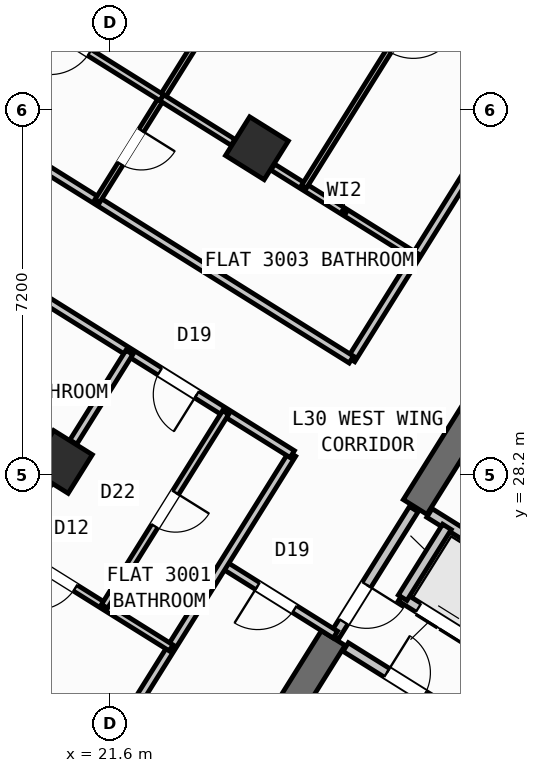
"""IFC4 building model, lengths in metres.
Left out: names, types, materials, properties, quantities, classifications, styles, units other than length and angle.
Written with IfcOpenShell. Run it as: python <this file> out.ifc"""

import sys

from ifc_helpers import new_model, si_unit, direction, frame, frame_2d, origin, origin_2d, place, context, subcontext, project, spatial, rectangle, hollow_rectangle, extrude, source, transform, mapped, element, fill, save


model = new_model("IFC4")
c1 = context("Model", 3, precision=1e-05, world=origin(), true_north=direction((0.0, 1.0)))
c2 = subcontext(c1, "Body", "Model", "MODEL_VIEW")
j1 = project(units=[si_unit("LENGTHUNIT", "METRE"), si_unit("PLANEANGLEUNIT", "RADIAN")], contexts=[c1])
p1 = place(None, origin())
s1 = spatial("IfcSite", under=j1, at=p1, CompositionType="ELEMENT")
p2 = place(p1, origin())
s2 = spatial("IfcBuilding", under=s1, at=p2, CompositionType="ELEMENT")
p3 = place(p2, frame((0.0, 0.0, 119.7)))
s3 = spatial("IfcBuildingStorey", under=s2, at=p3, CompositionType="ELEMENT", Elevation=119.7)
p4 = place(p3, frame((29.517, 30.594, 0.0), z_axis=(0.0, 0.0, 1.0), x_axis=(-0.529906864564, -0.848055844204, 0.0)))
e1 = element("IfcWall", 1, at=p4, inside=s3, PredefinedType="SHEAR", context=c2, shape_type="SweptSolid", body=[
    extrude(rectangle(XDim=3.575, YDim=0.55, at=frame_2d((1.788, 0.0))), origin(), (0.0, 0.0, 1.0), 3.35),
])
p5 = place(p3, frame((26.007, 24.976, 0.0), z_axis=(0.0, 0.0, 1.0), x_axis=(-0.529923795287, -0.848045264823, 0.0)))
e2 = element("IfcWall", 2, at=p5, inside=s3, PredefinedType="SHEAR", context=c2, shape_type="SweptSolid", body=[
    extrude(rectangle(XDim=6.425, YDim=0.55, at=frame_2d((3.212, 0.0))), origin(), (0.0, 0.0, 1.0), 3.35),
])
m1 = source(origin(), c2, "Body", "SweptSolid", [
    extrude(hollow_rectangle(XDim=0.9, YDim=0.9, WallThickness=0.036, at=origin_2d()), origin(), (0.0, 0.0, 1.0), 3.6),
])
for number, where, z_axis, x_axis in (
    (3, (24.5, 34.643, 0.0), (0.0, 0.0, 1.0), (-0.848, 0.53, 0.0)),
    (4, (20.632, 28.452, 0.0), (0.0, 0.0, 1.0), (-0.848, 0.53, 0.0)),
):
    element("IfcColumn", number, at=place(p3, frame(where, z_axis=z_axis, x_axis=x_axis)), inside=s3, PredefinedType="COLUMN", context=c2, shape_type="MappedRepresentation", body=[
        mapped(m1, transform((0.0, 0.0, 0.0), scale=1.0)),
    ])
p6 = place(p3, frame((31.76, 12.183, 0.0), z_axis=(0.0, 0.0, 1.0), x_axis=(-0.848047074256, 0.529920899612, 0.0)))
e5 = element("IfcWall", 5, at=p6, inside=s3, PredefinedType="STANDARD", context=c2, shape_type="SweptSolid", body=[
    extrude(rectangle(XDim=30.652, YDim=0.32, at=frame_2d((15.326, 0.0))), origin(), (0.0, 0.0, 1.0), 3.35),
])
p7 = place(p6, frame((15.153, 0.0, 0.0)))
e6 = element("IfcOpeningElement", 6, at=p7, cuts=e5, PredefinedType="OPENING", context=c2, shape_type="SweptSolid", body=[
    extrude(rectangle(XDim=1.2, YDim=2.15, at=frame_2d((0.6, 1.075))), frame((0.0, 0.17, 0.0), z_axis=(0.0, -1.0, 0.0), x_axis=(1.0, 0.0, 0.0)), (0.0, 0.0, 1.0), 0.34),
])
p8 = place(p6, frame((2.002, 0.0, 0.8)))
e7 = element("IfcOpeningElement", 7, at=p8, cuts=e5, PredefinedType="OPENING", context=c2, shape_type="SweptSolid", body=[
    extrude(rectangle(XDim=2.1, YDim=1.55, at=frame_2d((1.05, 0.775))), frame((0.0, 0.17, 0.0), z_axis=(0.0, -1.0, 0.0), x_axis=(1.0, 0.0, 0.0)), (0.0, 0.0, 1.0), 0.34),
])
p9 = place(p6, frame((7.206, 0.0, 0.8)))
e8 = element("IfcOpeningElement", 8, at=p9, cuts=e5, PredefinedType="OPENING", context=c2, shape_type="SweptSolid", body=[
    extrude(rectangle(XDim=2.1, YDim=1.55, at=frame_2d((1.05, 0.775))), frame((0.0, 0.17, 0.0), z_axis=(0.0, -1.0, 0.0), x_axis=(1.0, 0.0, 0.0)), (0.0, 0.0, 1.0), 0.34),
])
p10 = place(p6, frame((12.648, 0.0, 1.0)))
e9 = element("IfcOpeningElement", 9, at=p10, cuts=e5, PredefinedType="OPENING", context=c2, shape_type="SweptSolid", body=[
    extrude(rectangle(XDim=0.9, YDim=1.25, at=frame_2d((0.45, 0.625))), frame((0.0, 0.17, 0.0), z_axis=(0.0, -1.0, 0.0), x_axis=(1.0, 0.0, 0.0)), (0.0, 0.0, 1.0), 0.34),
])
p11 = place(p6, frame((19.458, 0.0, 0.95)))
e10 = element("IfcOpeningElement", 10, at=p11, cuts=e5, PredefinedType="OPENING", context=c2, shape_type="SweptSolid", body=[
    extrude(rectangle(XDim=1.2, YDim=1.4, at=frame_2d((0.6, 0.7))), frame((0.0, 0.17, 0.0), z_axis=(0.0, -1.0, 0.0), x_axis=(1.0, 0.0, 0.0)), (0.0, 0.0, 1.0), 0.34),
])
p12 = place(p6, frame((21.858, 0.0, 0.95)))
e11 = element("IfcOpeningElement", 11, at=p12, cuts=e5, PredefinedType="OPENING", context=c2, shape_type="SweptSolid", body=[
    extrude(rectangle(XDim=1.2, YDim=1.4, at=frame_2d((0.6, 0.7))), frame((0.0, 0.17, 0.0), z_axis=(0.0, -1.0, 0.0), x_axis=(1.0, 0.0, 0.0)), (0.0, 0.0, 1.0), 0.34),
])
p13 = place(p6, frame((27.266, 0.0, 0.8)))
e12 = element("IfcOpeningElement", 12, at=p13, cuts=e5, PredefinedType="OPENING", context=c2, shape_type="SweptSolid", body=[
    extrude(rectangle(XDim=2.1, YDim=1.55, at=frame_2d((1.05, 0.775))), frame((0.0, 0.17, 0.0), z_axis=(0.0, -1.0, 0.0), x_axis=(1.0, 0.0, 0.0)), (0.0, 0.0, 1.0), 0.34),
])
p14 = place(p3, frame((17.424, 47.083, 0.0), z_axis=(0.0, 0.0, 1.0), x_axis=(0.848049927979, -0.529916332693, 0.0)))
e13 = element("IfcWall", 13, at=p14, inside=s3, PredefinedType="STANDARD", context=c2, shape_type="SweptSolid", body=[
    extrude(rectangle(XDim=29.223, YDim=0.32, at=frame_2d((14.612, 0.0))), origin(), (0.0, 0.0, 1.0), 3.35),
])
p15 = place(p14, frame((8.839, 0.0, 0.0)))
e14 = element("IfcOpeningElement", 14, at=p15, cuts=e13, PredefinedType="OPENING", context=c2, shape_type="SweptSolid", body=[
    extrude(rectangle(XDim=1.05, YDim=2.15, at=frame_2d((0.525, 1.075))), frame((0.0, 0.17, 0.0), z_axis=(0.0, -1.0, 0.0), x_axis=(1.0, 0.0, 0.0)), (0.0, 0.0, 1.0), 0.34),
])
p16 = place(p14, frame((0.719, 0.0, 0.85)))
e15 = element("IfcOpeningElement", 15, at=p16, cuts=e13, PredefinedType="OPENING", context=c2, shape_type="SweptSolid", body=[
    extrude(rectangle(XDim=1.8, YDim=1.5, at=frame_2d((0.9, 0.75))), frame((0.0, 0.17, 0.0), z_axis=(0.0, -1.0, 0.0), x_axis=(1.0, 0.0, 0.0)), (0.0, 0.0, 1.0), 0.34),
])
p17 = place(p14, frame((3.981, 0.0, 0.85)))
e16 = element("IfcOpeningElement", 16, at=p17, cuts=e13, PredefinedType="OPENING", context=c2, shape_type="SweptSolid", body=[
    extrude(rectangle(XDim=1.5, YDim=1.5, at=frame_2d((0.75, 0.75))), frame((0.0, 0.17, 0.0), z_axis=(0.0, -1.0, 0.0), x_axis=(1.0, 0.0, 0.0)), (0.0, 0.0, 1.0), 0.34),
])
p18 = place(p14, frame((7.021, 0.0, 0.95)))
e17 = element("IfcOpeningElement", 17, at=p18, cuts=e13, PredefinedType="OPENING", context=c2, shape_type="SweptSolid", body=[
    extrude(rectangle(XDim=1.2, YDim=1.4, at=frame_2d((0.6, 0.7))), frame((0.0, 0.17, 0.0), z_axis=(0.0, -1.0, 0.0), x_axis=(1.0, 0.0, 0.0)), (0.0, 0.0, 1.0), 0.34),
])
p19 = place(p14, frame((14.471, 0.0, 0.95)))
e18 = element("IfcOpeningElement", 18, at=p19, cuts=e13, PredefinedType="OPENING", context=c2, shape_type="SweptSolid", body=[
    extrude(rectangle(XDim=1.2, YDim=1.4, at=frame_2d((0.6, 0.7))), frame((0.0, 0.17, 0.0), z_axis=(0.0, -1.0, 0.0), x_axis=(1.0, 0.0, 0.0)), (0.0, 0.0, 1.0), 0.34),
])
p20 = place(p14, frame((17.254, 0.0, 1.0)))
e19 = element("IfcOpeningElement", 19, at=p20, cuts=e13, PredefinedType="OPENING", context=c2, shape_type="SweptSolid", body=[
    extrude(rectangle(XDim=0.9, YDim=1.25, at=frame_2d((0.45, 0.625))), frame((0.0, 0.17, 0.0), z_axis=(0.0, -1.0, 0.0), x_axis=(1.0, 0.0, 0.0)), (0.0, 0.0, 1.0), 0.34),
])
p21 = place(p14, frame((20.764, 0.0, 0.8)))
e20 = element("IfcOpeningElement", 20, at=p21, cuts=e13, PredefinedType="OPENING", context=c2, shape_type="SweptSolid", body=[
    extrude(rectangle(XDim=2.1, YDim=1.55, at=frame_2d((1.05, 0.775))), frame((0.0, 0.17, 0.0), z_axis=(0.0, -1.0, 0.0), x_axis=(1.0, 0.0, 0.0)), (0.0, 0.0, 1.0), 0.34),
])
p22 = place(p14, frame((25.403, 0.0, 0.8)))
e21 = element("IfcOpeningElement", 21, at=p22, cuts=e13, PredefinedType="OPENING", context=c2, shape_type="SweptSolid", body=[
    extrude(rectangle(XDim=2.1, YDim=1.55, at=frame_2d((1.05, 0.775))), frame((0.0, 0.17, 0.0), z_axis=(0.0, -1.0, 0.0), x_axis=(1.0, 0.0, 0.0)), (0.0, 0.0, 1.0), 0.34),
])
p23 = place(p3, frame((31.822, 24.998, 0.0), z_axis=(0.0, 0.0, 1.0), x_axis=(-0.848036912365, 0.52993716162, 0.0)))
e22 = element("IfcWall", 22, at=p23, inside=s3, PredefinedType="STANDARD", context=c2, shape_type="SweptSolid", body=[
    extrude(rectangle(XDim=4.618, YDim=0.2, at=frame_2d((2.309, 0.0))), origin(), (0.0, 0.0, 1.0), 3.34),
])
p24 = place(p3, frame((32.108, 22.814, 0.0), z_axis=(0.0, 0.0, 1.0), x_axis=(-0.848042229521, 0.529928652696, 0.0)))
e23 = element("IfcWall", 23, at=p24, inside=s3, PredefinedType="STANDARD", context=c2, shape_type="SweptSolid", body=[
    extrude(rectangle(XDim=5.62, YDim=0.2, at=frame_2d((2.81, 0.0))), origin(), (0.0, 0.0, 1.0), 3.34),
])
p25 = place(p24, frame((0.39, 0.0, 0.0)))
e24 = element("IfcOpeningElement", 24, at=p25, cuts=e23, PredefinedType="OPENING", context=c2, shape_type="SweptSolid", body=[
    extrude(rectangle(XDim=1.1, YDim=2.15, at=frame_2d((0.55, 1.075))), frame((0.0, 0.11, 0.0), z_axis=(0.0, -1.0, 0.0), x_axis=(1.0, 0.0, 0.0)), (0.0, 0.0, 1.0), 0.22),
])
p26 = place(p24, frame((2.25, 0.0, 0.0)))
e25 = element("IfcOpeningElement", 25, at=p26, cuts=e23, PredefinedType="OPENING", context=c2, shape_type="SweptSolid", body=[
    extrude(rectangle(XDim=1.1, YDim=2.15, at=frame_2d((0.55, 1.075))), frame((0.0, 0.11, 0.0), z_axis=(0.0, -1.0, 0.0), x_axis=(1.0, 0.0, 0.0)), (0.0, 0.0, 1.0), 0.22),
])
p27 = place(p24, frame((4.11, 0.0, 0.0)))
e26 = element("IfcOpeningElement", 26, at=p27, cuts=e23, PredefinedType="OPENING", context=c2, shape_type="SweptSolid", body=[
    extrude(rectangle(XDim=1.1, YDim=2.15, at=frame_2d((0.55, 1.075))), frame((0.0, 0.11, 0.0), z_axis=(0.0, -1.0, 0.0), x_axis=(1.0, 0.0, 0.0)), (0.0, 0.0, 1.0), 0.22),
])
p28 = place(p3, frame((28.25, 27.17, 0.0), z_axis=(0.0, 0.0, 1.0), x_axis=(-0.529905827651, -0.848056492117, 0.0)))
e27 = element("IfcWall", 27, at=p28, inside=s3, PredefinedType="STANDARD", context=c2, shape_type="SweptSolid", body=[
    extrude(rectangle(XDim=1.65, YDim=0.2, at=frame_2d((0.825, 0.0))), origin(), (0.0, 0.0, 1.0), 3.34),
])
p29 = place(p3, frame((31.525, 21.504, 0.0), z_axis=(0.0, 0.0, 1.0), x_axis=(-0.848040211232, 0.529931882541, 0.0)))
e28 = element("IfcWall", 28, at=p29, inside=s3, PredefinedType="STANDARD", context=c2, shape_type="SweptSolid", body=[
    extrude(rectangle(XDim=6.218, YDim=0.2, at=frame_2d((3.109, 0.0))), origin(), (0.0, 0.0, 1.0), 3.34),
])
p30 = place(p29, frame((4.4, 0.0, 0.0)))
e29 = element("IfcOpeningElement", 29, at=p30, cuts=e28, PredefinedType="OPENING", context=c2, shape_type="SweptSolid", body=[
    extrude(rectangle(XDim=0.86, YDim=2.05, at=frame_2d((0.43, 1.025))), frame((0.0, 0.11, 0.0), z_axis=(0.0, -1.0, 0.0), x_axis=(1.0, 0.0, 0.0)), (0.0, 0.0, 1.0), 0.22),
])
p31 = place(p29, frame((1.45, 0.0, 0.0)))
e30 = element("IfcOpeningElement", 30, at=p31, cuts=e28, PredefinedType="OPENING", context=c2, shape_type="SweptSolid", body=[
    extrude(rectangle(XDim=0.86, YDim=2.05, at=frame_2d((0.43, 1.025))), frame((0.0, 0.11, 0.0), z_axis=(0.0, -1.0, 0.0), x_axis=(1.0, 0.0, 0.0)), (0.0, 0.0, 1.0), 0.22),
])
p32 = place(p3, frame((27.596, 27.52, 0.0), z_axis=(0.0, 0.0, 1.0), x_axis=(-0.529865479138, -0.848081702443, 0.0)))
e31 = element("IfcWall", 31, at=p32, inside=s3, PredefinedType="STANDARD", context=c2, shape_type="SweptSolid", body=[
    extrude(rectangle(XDim=2.96, YDim=0.2, at=frame_2d((1.48, 0.0))), origin(), (0.0, 0.0, 1.0), 3.34),
])
p33 = place(p32, frame((1.76, 0.0, 0.0)))
e32 = element("IfcOpeningElement", 32, at=p33, cuts=e31, PredefinedType="OPENING", context=c2, shape_type="SweptSolid", body=[
    extrude(rectangle(XDim=0.86, YDim=2.05, at=frame_2d((0.43, 1.025))), frame((0.0, 0.11, 0.0), z_axis=(0.0, -1.0, 0.0), x_axis=(1.0, 0.0, 0.0)), (0.0, 0.0, 1.0), 0.22),
])
p34 = place(p3, frame((26.049, 25.044, 0.0), z_axis=(0.0, 0.0, 1.0), x_axis=(-0.848050851465, 0.529914854792, 0.0)))
e33 = element("IfcWall", 33, at=p34, inside=s3, PredefinedType="PARTITIONING", context=c2, shape_type="SweptSolid", body=[
    extrude(rectangle(XDim=2.61, YDim=0.16, at=frame_2d((1.305, 0.0))), origin(), (0.0, 0.0, 1.0), 2.775),
])
p35 = place(p34, frame((0.95, 0.0, 0.0)))
e34 = element("IfcOpeningElement", 34, at=p35, cuts=e33, PredefinedType="OPENING", context=c2, shape_type="SweptSolid", body=[
    extrude(rectangle(XDim=0.86, YDim=2.05, at=frame_2d((0.43, 1.025))), frame((0.0, 0.09, 0.0), z_axis=(0.0, -1.0, 0.0), x_axis=(1.0, 0.0, 0.0)), (0.0, 0.0, 1.0), 0.18),
])
p36 = place(p3, frame((31.239, 38.274, 0.0), z_axis=(0.0, 0.0, 1.0), x_axis=(-0.529920220799, -0.848047498427, 0.0)))
e35 = element("IfcWall", 35, at=p36, inside=s3, PredefinedType="PARTITIONING", context=c2, shape_type="SweptSolid", body=[
    extrude(rectangle(XDim=9.2, YDim=0.16, at=frame_2d((4.6, 0.0))), origin(), (0.0, 0.0, 1.0), 3.34),
])
p37 = place(p3, frame((25.198, 28.606, 0.0), z_axis=(0.0, 0.0, 1.0), x_axis=(-0.529926497642, -0.848043576178, 0.0)))
e36 = element("IfcWall", 36, at=p37, inside=s3, PredefinedType="PARTITIONING", context=c2, shape_type="SweptSolid", body=[
    extrude(rectangle(XDim=10.3, YDim=0.16, at=frame_2d((5.15, 0.0))), origin(), (0.0, 0.0, 1.0), 3.34),
])
p38 = place(p3, frame((26.363, 30.472, 0.0), z_axis=(0.0, 0.0, 1.0), x_axis=(-0.848052408131, 0.529912363569, 0.0)))
e37 = element("IfcWall", 37, at=p38, inside=s3, PredefinedType="PARTITIONING", context=c2, shape_type="SweptSolid", body=[
    extrude(rectangle(XDim=16.73, YDim=0.16, at=frame_2d((8.365, 0.0))), origin(), (0.0, 0.0, 1.0), 3.34),
])
p39 = place(p38, frame((7.55, 0.0, 0.0)))
e38 = element("IfcOpeningElement", 38, at=p39, cuts=e37, PredefinedType="OPENING", context=c2, shape_type="SweptSolid", body=[
    extrude(rectangle(XDim=1.0, YDim=2.1, at=frame_2d((0.5, 1.05))), frame((0.0, 0.09, 0.0), z_axis=(0.0, -1.0, 0.0), x_axis=(1.0, 0.0, 0.0)), (0.0, 0.0, 1.0), 0.18),
])
p40 = place(p38, frame((11.14, 0.0, 0.0)))
e39 = element("IfcOpeningElement", 39, at=p40, cuts=e37, PredefinedType="OPENING", context=c2, shape_type="SweptSolid", body=[
    extrude(rectangle(XDim=1.0, YDim=2.1, at=frame_2d((0.5, 1.05))), frame((0.0, 0.09, 0.0), z_axis=(0.0, -1.0, 0.0), x_axis=(1.0, 0.0, 0.0)), (0.0, 0.0, 1.0), 0.18),
])
p41 = place(p3, frame((25.198, 28.606, 0.0), z_axis=(0.0, 0.0, 1.0), x_axis=(-0.848052408131, 0.529912363569, 0.0)))
e40 = element("IfcWall", 40, at=p41, inside=s3, PredefinedType="PARTITIONING", context=c2, shape_type="SweptSolid", body=[
    extrude(rectangle(XDim=16.73, YDim=0.16, at=frame_2d((8.365, 0.0))), origin(), (0.0, 0.0, 1.0), 3.34),
])
p42 = place(p41, frame((2.22, 0.0, 0.0)))
e41 = element("IfcOpeningElement", 41, at=p42, cuts=e40, PredefinedType="OPENING", context=c2, shape_type="SweptSolid", body=[
    extrude(rectangle(XDim=0.86, YDim=2.05, at=frame_2d((0.43, 1.025))), frame((0.0, 0.09, 0.0), z_axis=(0.0, -1.0, 0.0), x_axis=(1.0, 0.0, 0.0)), (0.0, 0.0, 1.0), 0.18),
])
p43 = place(p41, frame((12.084, 0.0, 0.0)))
e42 = element("IfcOpeningElement", 42, at=p43, cuts=e40, PredefinedType="OPENING", context=c2, shape_type="SweptSolid", body=[
    extrude(rectangle(XDim=1.0, YDim=2.1, at=frame_2d((0.5, 1.05))), frame((0.0, 0.09, 0.0), z_axis=(0.0, -1.0, 0.0), x_axis=(1.0, 0.0, 0.0)), (0.0, 0.0, 1.0), 0.18),
])
p44 = place(p3, frame((21.983, 30.615, 0.0), z_axis=(0.0, 0.0, 1.0), x_axis=(-0.529956894714, -0.848024580862, 0.0)))
e43 = element("IfcWall", 43, at=p44, inside=s3, PredefinedType="PARTITIONING", context=c2, shape_type="SweptSolid", body=[
    extrude(rectangle(XDim=2.088, YDim=0.16, at=frame_2d((1.044, 0.0))), origin(), (0.0, 0.0, 1.0), 2.775),
])
p45 = place(p3, frame((22.807, 24.781, 0.0), z_axis=(0.0, 0.0, 1.0), x_axis=(-0.84803087207, 0.529946827537, 0.0)))
e44 = element("IfcWall", 44, at=p45, inside=s3, PredefinedType="PLUMBINGWALL", context=c2, shape_type="SweptSolid", body=[
    extrude(rectangle(XDim=3.79, YDim=0.14, at=frame_2d((1.895, 0.0))), origin(), (0.0, 0.0, 1.0), 3.34),
])
p46 = place(p45, frame((2.23, 0.0, 0.0)))
e45 = element("IfcOpeningElement", 45, at=p46, cuts=e44, PredefinedType="OPENING", context=c2, shape_type="SweptSolid", body=[
    extrude(rectangle(XDim=0.92, YDim=2.08, at=frame_2d((0.46, 1.04))), frame((0.0, 0.08, 0.0), z_axis=(0.0, -1.0, 0.0), x_axis=(1.0, 0.0, 0.0)), (0.0, 0.0, 1.0), 0.16),
])
p47 = place(p3, frame((23.883, 29.427, 0.0), z_axis=(0.0, 0.0, 1.0), x_axis=(-0.529950281337, -0.84802871373, 0.0)))
e46 = element("IfcWall", 46, at=p47, inside=s3, PredefinedType="PLUMBINGWALL", context=c2, shape_type="SweptSolid", body=[
    extrude(rectangle(XDim=4.51, YDim=0.14, at=frame_2d((2.255, 0.0))), origin(), (0.0, 0.0, 1.0), 2.995),
])
p48 = place(p47, frame((1.865, 0.0, 0.0)))
e47 = element("IfcOpeningElement", 47, at=p48, cuts=e46, PredefinedType="OPENING", context=c2, shape_type="SweptSolid", body=[
    extrude(rectangle(XDim=0.78, YDim=2.05, at=frame_2d((0.39, 1.025))), frame((0.0, 0.08, 0.0), z_axis=(0.0, -1.0, 0.0), x_axis=(1.0, 0.0, 0.0)), (0.0, 0.0, 1.0), 0.16),
])
p49 = place(p3, frame((26.37, 41.635, 0.0), z_axis=(0.0, 0.0, 1.0), x_axis=(-0.529917830441, -0.848048992088, 0.0)))
e48 = element("IfcWall", 48, at=p49, inside=s3, PredefinedType="PARTITIONING", context=c2, shape_type="SweptSolid", body=[
    extrude(rectangle(XDim=9.47, YDim=0.11, at=frame_2d((4.735, 0.0))), origin(), (0.0, 0.0, 1.0), 2.995),
])
p50 = place(p49, frame((7.83, 0.0, 0.0)))
e49 = element("IfcOpeningElement", 49, at=p50, cuts=e48, PredefinedType="OPENING", context=c2, shape_type="SweptSolid", body=[
    extrude(rectangle(XDim=0.78, YDim=2.05, at=frame_2d((0.39, 1.025))), frame((0.0, 0.065, 0.0), z_axis=(0.0, -1.0, 0.0), x_axis=(1.0, 0.0, 0.0)), (0.0, 0.0, 1.0), 0.13),
])
p51 = place(p49, frame((3.075, 0.0, 0.0)))
e50 = element("IfcOpeningElement", 50, at=p51, cuts=e48, PredefinedType="OPENING", context=c2, shape_type="SweptSolid", body=[
    extrude(rectangle(XDim=0.92, YDim=2.08, at=frame_2d((0.46, 1.04))), frame((0.0, 0.065, 0.0), z_axis=(0.0, -1.0, 0.0), x_axis=(1.0, 0.0, 0.0)), (0.0, 0.0, 1.0), 0.13),
])
p52 = place(p3, frame((22.623, 35.639, 0.0), z_axis=(0.0, 0.0, 1.0), x_axis=(-0.8480485946, 0.529918466555, 0.0)))
e51 = element("IfcWall", 51, at=p52, inside=s3, PredefinedType="PLUMBINGWALL", context=c2, shape_type="SweptSolid", body=[
    extrude(rectangle(XDim=3.818, YDim=0.14, at=frame_2d((1.909, 0.0))), origin(), (0.0, 0.0, 1.0), 2.775),
])
p53 = place(p52, frame((1.68, 0.0, 0.0)))
e52 = element("IfcOpeningElement", 52, at=p53, cuts=e51, PredefinedType="OPENING", context=c2, shape_type="SweptSolid", body=[
    extrude(rectangle(XDim=0.92, YDim=2.08, at=frame_2d((0.46, 1.04))), frame((0.0, 0.08, 0.0), z_axis=(0.0, -1.0, 0.0), x_axis=(1.0, 0.0, 0.0)), (0.0, 0.0, 1.0), 0.16),
])
p54 = place(p3, frame((27.635, 32.507, 0.0), z_axis=(0.0, 0.0, 1.0), x_axis=(-0.848064240775, 0.529893426567, 0.0)))
e53 = element("IfcWall", 53, at=p54, inside=s3, PredefinedType="PLUMBINGWALL", context=c2, shape_type="SweptSolid", body=[
    extrude(rectangle(XDim=3.328, YDim=0.14, at=frame_2d((1.664, 0.0))), origin(), (0.0, 0.0, 1.0), 2.775),
])
p55 = place(p3, frame((24.029, 34.76, 0.0), z_axis=(0.0, 0.0, 1.0), x_axis=(-0.848023120795, 0.529959231071, 0.0)))
e54 = element("IfcWall", 54, at=p55, inside=s3, PredefinedType="PLUMBINGWALL", context=c2, shape_type="SweptSolid", body=[
    extrude(rectangle(XDim=1.658, YDim=0.14, at=frame_2d((0.829, 0.0))), origin(), (0.0, 0.0, 1.0), 2.775),
])
p56 = place(p3, frame((29.177, 39.881, 0.0), z_axis=(0.0, 0.0, 1.0), x_axis=(-0.529930649952, -0.848040981463, 0.0)))
e55 = element("IfcWall", 55, at=p56, inside=s3, PredefinedType="PARTITIONING", context=c2, shape_type="SweptSolid", body=[
    extrude(rectangle(XDim=7.07, YDim=0.11, at=frame_2d((3.535, 0.0))), origin(), (0.0, 0.0, 1.0), 3.34),
])
p57 = place(p56, frame((3.0, 0.0, 0.0)))
e56 = element("IfcOpeningElement", 56, at=p57, cuts=e55, PredefinedType="OPENING", context=c2, shape_type="SweptSolid", body=[
    extrude(rectangle(XDim=0.92, YDim=2.08, at=frame_2d((0.46, 1.04))), frame((0.0, 0.065, 0.0), z_axis=(0.0, -1.0, 0.0), x_axis=(1.0, 0.0, 0.0)), (0.0, 0.0, 1.0), 0.13),
])
m2 = source(origin(), c2, "Body", "SweptSolid", [
    extrude(rectangle(XDim=1.1, YDim=2.15, at=frame_2d((0.55, 1.075))), frame((0.0, 0.025, 0.0), z_axis=(0.0, -1.0, 0.0), x_axis=(1.0, 0.0, 0.0)), (0.0, 0.0, 1.0), 0.05),
])
p58 = place(p27, origin())
e57 = element("IfcDoor", 57, at=p58, inside=s3, OperationType="DOUBLE_DOOR_SLIDING", PredefinedType="DOOR", context=c2, shape_type="MappedRepresentation", body=[
    mapped(m2, transform((0.0, 0.0, 0.0), scale=1.0)),
])
fill(e26, e57)
m3 = source(origin(), c2, "Body", "SweptSolid", [
    extrude(rectangle(XDim=0.86, YDim=2.05, at=frame_2d((0.43, 1.025))), frame((0.0, 0.025, 0.0), z_axis=(0.0, -1.0, 0.0), x_axis=(1.0, 0.0, 0.0)), (0.0, 0.0, 1.0), 0.05),
])
p59 = place(p30, frame((0.86, 0.0, 0.0), z_axis=(0.0, 0.0, 1.0), x_axis=(-1.0, 0.0, 0.0)))
e58 = element("IfcDoor", 58, at=p59, inside=s3, OperationType="SINGLE_SWING_LEFT", PredefinedType="DOOR", context=c2, shape_type="MappedRepresentation", body=[
    mapped(m3, transform((0.0, 0.0, 0.0), scale=1.0)),
])
fill(e29, e58)
p60 = place(p35, origin())
e59 = element("IfcDoor", 59, at=p60, inside=s3, OperationType="SINGLE_SWING_RIGHT", PredefinedType="DOOR", context=c2, shape_type="MappedRepresentation", body=[
    mapped(m3, transform((0.0, 0.0, 0.0), scale=1.0)),
])
fill(e34, e59)
p61 = place(p33, origin())
e60 = element("IfcDoor", 60, at=p61, inside=s3, OperationType="SINGLE_SWING_LEFT", PredefinedType="DOOR", context=c2, shape_type="MappedRepresentation", body=[
    mapped(m3, transform((0.0, 0.0, 0.0), scale=1.0)),
])
fill(e32, e60)
p62 = place(p42, origin())
e61 = element("IfcDoor", 61, at=p62, inside=s3, OperationType="SINGLE_SWING_LEFT", PredefinedType="DOOR", context=c2, shape_type="MappedRepresentation", body=[
    mapped(m3, transform((0.0, 0.0, 0.0), scale=1.0)),
])
fill(e41, e61)
m4 = source(origin(), c2, "Body", "SweptSolid", [
    extrude(rectangle(XDim=0.92, YDim=2.08, at=frame_2d((0.46, 1.04))), frame((0.0, 0.025, 0.0), z_axis=(0.0, -1.0, 0.0), x_axis=(1.0, 0.0, 0.0)), (0.0, 0.0, 1.0), 0.05),
])
p63 = place(p46, origin())
e62 = element("IfcDoor", 62, at=p63, inside=s3, OperationType="SINGLE_SWING_RIGHT", PredefinedType="DOOR", context=c2, shape_type="MappedRepresentation", body=[
    mapped(m4, transform((0.0, 0.0, 0.0), scale=1.0)),
])
fill(e45, e62)
m5 = source(origin(), c2, "Body", "SweptSolid", [
    extrude(rectangle(XDim=0.78, YDim=2.05, at=frame_2d((0.39, 1.025))), frame((0.0, 0.025, 0.0), z_axis=(0.0, -1.0, 0.0), x_axis=(1.0, 0.0, 0.0)), (0.0, 0.0, 1.0), 0.05),
])
p64 = place(p48, origin())
e63 = element("IfcDoor", 63, at=p64, inside=s3, OperationType="SINGLE_SWING_LEFT", PredefinedType="DOOR", context=c2, shape_type="MappedRepresentation", body=[
    mapped(m5, transform((0.0, 0.0, 0.0), scale=1.0)),
])
fill(e47, e63)
p65 = place(p53, origin())
e64 = element("IfcDoor", 64, at=p65, inside=s3, OperationType="SINGLE_SWING_RIGHT", PredefinedType="DOOR", context=c2, shape_type="MappedRepresentation", body=[
    mapped(m4, transform((0.0, 0.0, 0.0), scale=1.0)),
])
fill(e52, e64)
p66 = place(p50, origin())
e65 = element("IfcDoor", 65, at=p66, inside=s3, OperationType="SINGLE_SWING_LEFT", PredefinedType="DOOR", context=c2, shape_type="MappedRepresentation", body=[
    mapped(m5, transform((0.0, 0.0, 0.0), scale=1.0)),
])
fill(e49, e65)
save(model, sys.argv[1])
